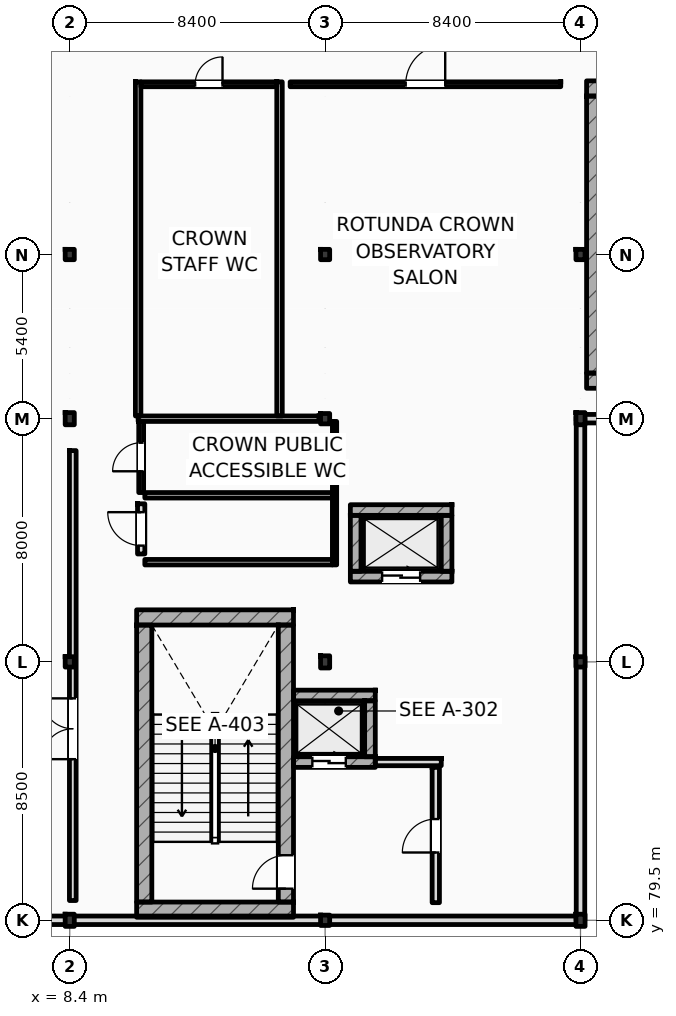
"""IFC4 building model, lengths in metres.
Left out: names, types, materials, properties, quantities, classifications, styles, units other than length and angle.
Written with IfcOpenShell. Run it as: python <this file> out.ifc"""

import sys

from ifc_helpers import new_model, si_unit, direction, frame, frame_2d, origin, origin_2d, place, context, subcontext, project, spatial, rectangle, i_section, extrude, element, fill, save


model = new_model("IFC4")
c1 = context("Model", 3, precision=1e-05, world=origin(), true_north=direction((0.0, 1.0)))
c2 = subcontext(c1, "Body", "Model", "MODEL_VIEW")
j1 = project(units=[si_unit("LENGTHUNIT", "METRE"), si_unit("PLANEANGLEUNIT", "RADIAN")], contexts=[c1])
p1 = place(None, origin())
s1 = spatial("IfcSite", under=j1, at=p1, CompositionType="ELEMENT")
p2 = place(p1, origin())
s2 = spatial("IfcBuilding", under=s1, at=p2, CompositionType="ELEMENT")
p3 = place(p2, frame((0.0, 0.0, 46.8)))
s3 = spatial("IfcBuildingStorey", under=s2, at=p3, CompositionType="ELEMENT", Elevation=46.8)
p4 = place(p3, frame((8.4, 79.5, 0.0), z_axis=(0.0, 0.0, 1.0), x_axis=(1.0, 0.0, 0.0)))
e1 = element("IfcColumn", 1, at=p4, inside=s3, PredefinedType="COLUMN", context=c2, shape_type="SweptSolid", body=[
    extrude(i_section(OverallWidth=0.3, OverallDepth=0.4, WebThickness=0.013, FlangeThickness=0.024, FilletRadius=0.027, at=origin_2d()), origin(), (0.0, 0.0, 1.0), 4.8),
])
p5 = place(p3, frame((8.4, 88.0, 0.0), z_axis=(0.0, 0.0, 1.0), x_axis=(1.0, 0.0, 0.0)))
e2 = element("IfcColumn", 2, at=p5, inside=s3, PredefinedType="COLUMN", context=c2, shape_type="SweptSolid", body=[
    extrude(i_section(OverallWidth=0.3, OverallDepth=0.34, WebThickness=0.012, FlangeThickness=0.021, FilletRadius=0.027, at=origin_2d()), origin(), (0.0, 0.0, 1.0), 4.8),
])
p6 = place(p3, frame((8.4, 96.0, 0.0), z_axis=(0.0, 0.0, 1.0), x_axis=(1.0, 0.0, 0.0)))
e3 = element("IfcColumn", 3, at=p6, inside=s3, PredefinedType="COLUMN", context=c2, shape_type="SweptSolid", body=[
    extrude(i_section(OverallWidth=0.3, OverallDepth=0.4, WebThickness=0.013, FlangeThickness=0.024, FilletRadius=0.027, at=origin_2d()), origin(), (0.0, 0.0, 1.0), 4.8),
])
p7 = place(p3, frame((16.8, 79.5, 0.0), z_axis=(0.0, 0.0, 1.0), x_axis=(1.0, 0.0, 0.0)))
e4 = element("IfcColumn", 4, at=p7, inside=s3, PredefinedType="COLUMN", context=c2, shape_type="SweptSolid", body=[
    extrude(i_section(OverallWidth=0.3, OverallDepth=0.34, WebThickness=0.012, FlangeThickness=0.021, FilletRadius=0.027, at=origin_2d()), origin(), (0.0, 0.0, 1.0), 4.8),
])
p8 = place(p3, frame((16.8, 88.0, 0.0), z_axis=(0.0, 0.0, 1.0), x_axis=(1.0, 0.0, 0.0)))
e5 = element("IfcColumn", 5, at=p8, inside=s3, PredefinedType="COLUMN", context=c2, shape_type="SweptSolid", body=[
    extrude(i_section(OverallWidth=0.3, OverallDepth=0.4, WebThickness=0.013, FlangeThickness=0.024, FilletRadius=0.027, at=origin_2d()), origin(), (0.0, 0.0, 1.0), 4.8),
])
p9 = place(p3, frame((16.8, 96.0, 0.0), z_axis=(0.0, 0.0, 1.0), x_axis=(1.0, 0.0, 0.0)))
e6 = element("IfcColumn", 6, at=p9, inside=s3, PredefinedType="COLUMN", context=c2, shape_type="SweptSolid", body=[
    extrude(i_section(OverallWidth=0.3, OverallDepth=0.34, WebThickness=0.012, FlangeThickness=0.021, FilletRadius=0.027, at=origin_2d()), origin(), (0.0, 0.0, 1.0), 4.8),
])
p10 = place(p3, frame((25.2, 79.5, 0.0), z_axis=(0.0, 0.0, 1.0), x_axis=(1.0, 0.0, 0.0)))
e7 = element("IfcColumn", 7, at=p10, inside=s3, PredefinedType="COLUMN", context=c2, shape_type="SweptSolid", body=[
    extrude(i_section(OverallWidth=0.3, OverallDepth=0.4, WebThickness=0.013, FlangeThickness=0.024, FilletRadius=0.027, at=origin_2d()), origin(), (0.0, 0.0, 1.0), 4.8),
])
p11 = place(p3, frame((25.2, 88.0, 0.0), z_axis=(0.0, 0.0, 1.0), x_axis=(1.0, 0.0, 0.0)))
e8 = element("IfcColumn", 8, at=p11, inside=s3, PredefinedType="COLUMN", context=c2, shape_type="SweptSolid", body=[
    extrude(i_section(OverallWidth=0.3, OverallDepth=0.34, WebThickness=0.012, FlangeThickness=0.021, FilletRadius=0.027, at=origin_2d()), origin(), (0.0, 0.0, 1.0), 4.8),
])
p12 = place(p3, frame((25.2, 96.0, 0.0), z_axis=(0.0, 0.0, 1.0), x_axis=(1.0, 0.0, 0.0)))
e9 = element("IfcColumn", 9, at=p12, inside=s3, PredefinedType="COLUMN", context=c2, shape_type="SweptSolid", body=[
    extrude(i_section(OverallWidth=0.3, OverallDepth=0.4, WebThickness=0.013, FlangeThickness=0.024, FilletRadius=0.027, at=origin_2d()), origin(), (0.0, 0.0, 1.0), 4.8),
])
for number, where, z_axis, x_axis in (
    (10, (8.4, 101.4, 0.0), (0.0, 0.0, 1.0), (1.0, 0.0, 0.0)),
    (11, (16.8, 101.4, 0.0), (0.0, 0.0, 1.0), (1.0, 0.0, 0.0)),
    (12, (25.2, 101.4, 0.0), (0.0, 0.0, 1.0), (1.0, 0.0, 0.0)),
):
    element("IfcColumn", number, at=place(p3, frame(where, z_axis=z_axis, x_axis=x_axis)), inside=s3, PredefinedType="COLUMN", context=c2, shape_type="SweptSolid", body=[
        extrude(i_section(OverallWidth=0.3, OverallDepth=0.34, WebThickness=0.012, FlangeThickness=0.021, FilletRadius=0.027, at=origin_2d()), origin(), (0.0, 0.0, 1.0), 4.8),
    ])
for number, where, z_axis, x_axis in (
    (13, (10.6, 89.462, 0.0), (0.0, 0.0, 1.0), (1.0, 0.0, 0.0)),
    (14, (10.6, 79.85, 0.0), (0.0, 0.0, 1.0), (1.0, 0.0, 0.0)),
):
    element("IfcWall", number, at=place(p3, frame(where, z_axis=z_axis, x_axis=x_axis)), inside=s3, PredefinedType="SHEAR", context=c2, shape_type="SweptSolid", body=[
        extrude(rectangle(XDim=5.16, YDim=0.5, at=frame_2d((2.58, 0.0))), origin(), (0.0, 0.0, 1.0), 4.8),
    ])
p13 = place(p3, frame((10.85, 80.1, 0.0), z_axis=(0.0, 0.0, 1.0), x_axis=(0.0, 1.0, 0.0)))
e15 = element("IfcWall", 15, at=p13, inside=s3, PredefinedType="SHEAR", context=c2, shape_type="SweptSolid", body=[
    extrude(rectangle(XDim=9.112, YDim=0.5, at=frame_2d((4.556, 0.0))), origin(), (0.0, 0.0, 1.0), 4.8),
])
p14 = place(p3, frame((15.51, 80.1, 0.0), z_axis=(0.0, 0.0, 1.0), x_axis=(0.0, 1.0, 0.0)))
e16 = element("IfcWall", 16, at=p14, inside=s3, PredefinedType="SHEAR", context=c2, shape_type="SweptSolid", body=[
    extrude(rectangle(XDim=9.112, YDim=0.5, at=frame_2d((4.556, 0.0))), origin(), (0.0, 0.0, 1.0), 4.8),
])
p15 = place(p14, frame((0.44, 0.0, 0.0)))
e17 = element("IfcOpeningElement", 17, at=p15, cuts=e16, PredefinedType="OPENING", context=c2, shape_type="SweptSolid", body=[
    extrude(rectangle(XDim=1.1, YDim=2.2, at=frame_2d((0.55, 1.1))), frame((0.0, 0.26, 0.0), z_axis=(0.0, -1.0, 0.0), x_axis=(1.0, 0.0, 0.0)), (0.0, 0.0, 1.0), 0.52),
])
for number, where, z_axis, x_axis in (
    (18, (25.4, 106.862, 0.0), (0.0, 0.0, 1.0), (1.0, 0.0, 0.0)),
    (19, (25.4, 97.25, 0.0), (0.0, 0.0, 1.0), (1.0, 0.0, 0.0)),
):
    element("IfcWall", number, at=place(p3, frame(where, z_axis=z_axis, x_axis=x_axis)), inside=s3, PredefinedType="SHEAR", context=c2, shape_type="SweptSolid", body=[
        extrude(rectangle(XDim=5.16, YDim=0.5, at=frame_2d((2.58, 0.0))), origin(), (0.0, 0.0, 1.0), 4.8),
    ])
p16 = place(p3, frame((25.65, 97.5, 0.0), z_axis=(0.0, 0.0, 1.0), x_axis=(0.0, 1.0, 0.0)))
e20 = element("IfcWall", 20, at=p16, inside=s3, PredefinedType="SHEAR", context=c2, shape_type="SweptSolid", body=[
    extrude(rectangle(XDim=9.112, YDim=0.5, at=frame_2d((4.556, 0.0))), origin(), (0.0, 0.0, 1.0), 4.8),
])
p17 = place(p3, frame((0.0, 79.5, 0.0), z_axis=(0.0, 0.0, 1.0), x_axis=(1.0, 0.0, 0.0)))
e21 = element("IfcWall", 21, at=p17, inside=s3, PredefinedType="STANDARD", context=c2, shape_type="SweptSolid", body=[
    extrude(rectangle(XDim=25.2, YDim=0.28, at=frame_2d((12.6, 0.0))), origin(), (0.0, 0.0, 1.0), 3.98),
])
p18 = place(p3, frame((25.2, 96.0, 0.0), z_axis=(0.0, 0.0, 1.0), x_axis=(1.0, 0.0, 0.0)))
e22 = element("IfcWall", 22, at=p18, inside=s3, PredefinedType="STANDARD", context=c2, shape_type="SweptSolid", body=[
    extrude(rectangle(XDim=54.6, YDim=0.28, at=frame_2d((27.3, 0.0))), origin(), (0.0, 0.0, 1.0), 4.08),
])
p19 = place(p3, frame((25.2, 79.5, 0.0), z_axis=(0.0, 0.0, 1.0), x_axis=(0.0, 1.0, 0.0)))
e23 = element("IfcWall", 23, at=p19, inside=s3, PredefinedType="STANDARD", context=c2, shape_type="SweptSolid", body=[
    extrude(rectangle(XDim=16.5, YDim=0.28, at=frame_2d((8.25, 0.0))), origin(), (0.0, 0.0, 1.0), 4.17),
])
p20 = place(p3, frame((15.76, 86.895, 0.0), z_axis=(0.0, 0.0, 1.0), x_axis=(1.0, 0.0, 0.0)))
e24 = element("IfcWall", 24, at=p20, inside=s3, PredefinedType="SHEAR", context=c2, shape_type="SweptSolid", body=[
    extrude(rectangle(XDim=2.69, YDim=0.35, at=frame_2d((1.345, 0.0))), origin(), (0.0, 0.0, 1.0), 4.54),
])
p21 = place(p3, frame((15.76, 84.705, 0.0), z_axis=(0.0, 0.0, 1.0), x_axis=(1.0, 0.0, 0.0)))
e25 = element("IfcWall", 25, at=p21, inside=s3, PredefinedType="SHEAR", context=c2, shape_type="SweptSolid", body=[
    extrude(rectangle(XDim=2.69, YDim=0.35, at=frame_2d((1.345, 0.0))), origin(), (0.0, 0.0, 1.0), 4.54),
])
p22 = place(p21, frame((0.62, 0.0, 0.0)))
e26 = element("IfcOpeningElement", 26, at=p22, cuts=e25, PredefinedType="OPENING", context=c2, shape_type="SweptSolid", body=[
    extrude(rectangle(XDim=1.1, YDim=2.2, at=frame_2d((0.55, 1.1))), frame((0.0, 0.185, 0.0), z_axis=(0.0, -1.0, 0.0), x_axis=(1.0, 0.0, 0.0)), (0.0, 0.0, 1.0), 0.37),
])
p23 = place(p3, frame((18.275, 84.88, 0.0), z_axis=(0.0, 0.0, 1.0), x_axis=(0.0, 1.0, 0.0)))
e27 = element("IfcWall", 27, at=p23, inside=s3, PredefinedType="SHEAR", context=c2, shape_type="SweptSolid", body=[
    extrude(rectangle(XDim=1.84, YDim=0.35, at=frame_2d((0.92, 0.0))), origin(), (0.0, 0.0, 1.0), 4.54),
])
p24 = place(p3, frame((17.63, 92.995, 0.0), z_axis=(0.0, 0.0, 1.0), x_axis=(1.0, 0.0, 0.0)))
e28 = element("IfcWall", 28, at=p24, inside=s3, PredefinedType="SHEAR", context=c2, shape_type="SweptSolid", body=[
    extrude(rectangle(XDim=3.34, YDim=0.35, at=frame_2d((1.67, 0.0))), origin(), (0.0, 0.0, 1.0), 4.54),
])
p25 = place(p3, frame((17.63, 90.805, 0.0), z_axis=(0.0, 0.0, 1.0), x_axis=(1.0, 0.0, 0.0)))
e29 = element("IfcWall", 29, at=p25, inside=s3, PredefinedType="SHEAR", context=c2, shape_type="SweptSolid", body=[
    extrude(rectangle(XDim=3.34, YDim=0.35, at=frame_2d((1.67, 0.0))), origin(), (0.0, 0.0, 1.0), 4.54),
])
p26 = place(p25, frame((1.045, 0.0, 0.0)))
e30 = element("IfcOpeningElement", 30, at=p26, cuts=e29, PredefinedType="OPENING", context=c2, shape_type="SweptSolid", body=[
    extrude(rectangle(XDim=1.25, YDim=2.25, at=frame_2d((0.625, 1.125))), frame((0.0, 0.185, 0.0), z_axis=(0.0, -1.0, 0.0), x_axis=(1.0, 0.0, 0.0)), (0.0, 0.0, 1.0), 0.37),
])
for number, where, z_axis, x_axis in (
    (31, (17.805, 90.98, 0.0), (0.0, 0.0, 1.0), (0.0, 1.0, 0.0)),
    (32, (20.795, 90.98, 0.0), (0.0, 0.0, 1.0), (0.0, 1.0, 0.0)),
):
    element("IfcWall", number, at=place(p3, frame(where, z_axis=z_axis, x_axis=x_axis)), inside=s3, PredefinedType="SHEAR", context=c2, shape_type="SweptSolid", body=[
        extrude(rectangle(XDim=1.84, YDim=0.35, at=frame_2d((0.92, 0.0))), origin(), (0.0, 0.0, 1.0), 4.54),
    ])
p27 = place(p3, frame((18.45, 84.705, 0.0), z_axis=(0.0, 0.0, 1.0), x_axis=(1.0, 0.0, 0.0)))
e33 = element("IfcWall", 33, at=p27, inside=s3, PredefinedType="STANDARD", context=c2, shape_type="SweptSolid", body=[
    extrude(rectangle(XDim=2.17, YDim=0.24, at=frame_2d((1.085, 0.0))), origin(), (0.0, 0.0, 1.0), 4.54),
])
p28 = place(p3, frame((20.44, 80.08, 0.0), z_axis=(0.0, 0.0, 1.0), x_axis=(0.0, 1.0, 0.0)))
e34 = element("IfcWall", 34, at=p28, inside=s3, PredefinedType="STANDARD", context=c2, shape_type="SweptSolid", body=[
    extrude(rectangle(XDim=4.45, YDim=0.24, at=frame_2d((2.225, 0.0))), origin(), (0.0, 0.0, 1.0), 4.54),
])
p29 = place(p28, frame((1.65, 0.0, 0.0)))
e35 = element("IfcOpeningElement", 35, at=p29, cuts=e34, PredefinedType="OPENING", context=c2, shape_type="SweptSolid", body=[
    extrude(rectangle(XDim=1.1, YDim=2.2, at=frame_2d((0.55, 1.1))), frame((0.0, 0.13, 0.0), z_axis=(0.0, -1.0, 0.0), x_axis=(1.0, 0.0, 0.0)), (0.0, 0.0, 1.0), 0.26),
])
p30 = place(p3, frame((15.65, 107.0, 0.0), z_axis=(0.0, 0.0, 1.0), x_axis=(1.0, 0.0, 0.0)))
e36 = element("IfcWall", 36, at=p30, inside=s3, PredefinedType="PARTITIONING", context=c2, shape_type="SweptSolid", body=[
    extrude(rectangle(XDim=8.9, YDim=0.16, at=frame_2d((4.45, 0.0))), origin(), (0.0, 0.0, 1.0), 4.54),
])
p31 = place(p30, frame((3.8, 0.0, 0.0)))
e37 = element("IfcOpeningElement", 37, at=p31, cuts=e36, PredefinedType="OPENING", context=c2, shape_type="SweptSolid", body=[
    extrude(rectangle(XDim=1.3, YDim=2.2, at=frame_2d((0.65, 1.1))), frame((0.0, 0.09, 0.0), z_axis=(0.0, -1.0, 0.0), x_axis=(1.0, 0.0, 0.0)), (0.0, 0.0, 1.0), 0.18),
])
p32 = place(p3, frame((8.5, 80.15, 0.0), z_axis=(0.0, 0.0, 1.0), x_axis=(0.0, 1.0, 0.0)))
e38 = element("IfcWall", 38, at=p32, inside=s3, PredefinedType="PARTITIONING", context=c2, shape_type="SweptSolid", body=[
    extrude(rectangle(XDim=14.8, YDim=0.22, at=frame_2d((7.4, 0.0))), origin(), (0.0, 0.0, 1.0), 4.17),
])
p33 = place(p32, frame((4.65, 0.0, 0.0)))
e39 = element("IfcOpeningElement", 39, at=p33, cuts=e38, PredefinedType="OPENING", context=c2, shape_type="SweptSolid", body=[
    extrude(rectangle(XDim=2.0, YDim=2.35, at=frame_2d((1.0, 1.175))), frame((0.0, 0.12, 0.0), z_axis=(0.0, -1.0, 0.0), x_axis=(1.0, 0.0, 0.0)), (0.0, 0.0, 1.0), 0.24),
])
p34 = place(p3, frame((10.75, 91.55, 0.0), z_axis=(0.0, 0.0, 1.0), x_axis=(0.0, 1.0, 0.0)))
e40 = element("IfcWall", 40, at=p34, inside=s3, PredefinedType="STANDARD", context=c2, shape_type="SweptSolid", body=[
    extrude(rectangle(XDim=1.65, YDim=0.24, at=frame_2d((0.825, 0.0))), origin(), (0.0, 0.0, 1.0), 4.54),
])
p35 = place(p34, frame((0.275, 0.0, 0.0)))
e41 = element("IfcOpeningElement", 41, at=p35, cuts=e40, PredefinedType="OPENING", context=c2, shape_type="SweptSolid", body=[
    extrude(rectangle(XDim=1.1, YDim=2.2, at=frame_2d((0.55, 1.1))), frame((0.0, 0.13, 0.0), z_axis=(0.0, -1.0, 0.0), x_axis=(1.0, 0.0, 0.0)), (0.0, 0.0, 1.0), 0.26),
])
p36 = place(p3, frame((10.75, 93.57, 0.0), z_axis=(0.0, 0.0, 1.0), x_axis=(0.0, 1.0, 0.0)))
e42 = element("IfcWall", 42, at=p36, inside=s3, PredefinedType="PARTITIONING", context=c2, shape_type="SweptSolid", body=[
    extrude(rectangle(XDim=2.34, YDim=0.16, at=frame_2d((1.17, 0.0))), origin(), (0.0, 0.0, 1.0), 4.54),
])
p37 = place(p36, frame((0.7, 0.0, 0.0)))
e43 = element("IfcOpeningElement", 43, at=p37, cuts=e42, PredefinedType="OPENING", context=c2, shape_type="SweptSolid", body=[
    extrude(rectangle(XDim=0.94, YDim=2.15, at=frame_2d((0.47, 1.075))), frame((0.0, 0.09, 0.0), z_axis=(0.0, -1.0, 0.0), x_axis=(1.0, 0.0, 0.0)), (0.0, 0.0, 1.0), 0.18),
])
p38 = place(p3, frame((10.74, 107.0, 0.0), z_axis=(0.0, 0.0, 1.0), x_axis=(1.0, 0.0, 0.0)))
e44 = element("IfcWall", 44, at=p38, inside=s3, PredefinedType="PARTITIONING", context=c2, shape_type="SweptSolid", body=[
    extrude(rectangle(XDim=4.47, YDim=0.16, at=frame_2d((2.235, 0.0))), origin(), (0.0, 0.0, 1.0), 4.54),
])
p39 = place(p38, frame((1.785, 0.0, 0.0)))
e45 = element("IfcOpeningElement", 45, at=p39, cuts=e44, PredefinedType="OPENING", context=c2, shape_type="SweptSolid", body=[
    extrude(rectangle(XDim=0.9, YDim=2.1, at=frame_2d((0.45, 1.05))), frame((0.0, 0.09, 0.0), z_axis=(0.0, -1.0, 0.0), x_axis=(1.0, 0.0, 0.0)), (0.0, 0.0, 1.0), 0.18),
])
for number, where, z_axis, x_axis in (
    (46, (10.87, 91.28, 0.0), (0.0, 0.0, 1.0), (1.0, 0.0, 0.0)),
    (47, (10.87, 93.48, 0.0), (0.0, 0.0, 1.0), (1.0, 0.0, 0.0)),
):
    element("IfcWall", number, at=place(p3, frame(where, z_axis=z_axis, x_axis=x_axis)), inside=s3, PredefinedType="PARTITIONING", context=c2, shape_type="SweptSolid", body=[
        extrude(rectangle(XDim=6.17, YDim=0.18, at=frame_2d((3.085, 0.0))), origin(), (0.0, 0.0, 1.0), 4.54),
    ])
p40 = place(p3, frame((17.11, 91.19, 0.0), z_axis=(0.0, 0.0, 1.0), x_axis=(0.0, 1.0, 0.0)))
e48 = element("IfcWall", 48, at=p40, inside=s3, PredefinedType="PARTITIONING", context=c2, shape_type="SweptSolid", body=[
    extrude(rectangle(XDim=4.72, YDim=0.14, at=frame_2d((2.36, 0.0))), origin(), (0.0, 0.0, 1.0), 4.54),
])
p41 = place(p3, frame((10.65, 96.0, 0.0), z_axis=(0.0, 0.0, 1.0), x_axis=(1.0, 0.0, 0.0)))
e49 = element("IfcWall", 49, at=p41, inside=s3, PredefinedType="PARTITIONING", context=c2, shape_type="SweptSolid", body=[
    extrude(rectangle(XDim=5.95, YDim=0.18, at=frame_2d((2.975, 0.0))), origin(), (0.0, 0.0, 1.0), 3.98),
])
for number, where, z_axis, x_axis in (
    (50, (10.65, 96.09, 0.0), (0.0, 0.0, 1.0), (0.0, 1.0, 0.0)),
    (51, (15.3, 96.09, 0.0), (0.0, 0.0, 1.0), (0.0, 1.0, 0.0)),
):
    element("IfcWall", number, at=place(p3, frame(where, z_axis=z_axis, x_axis=x_axis)), inside=s3, PredefinedType="PARTITIONING", context=c2, shape_type="SweptSolid", body=[
        extrude(rectangle(XDim=10.99, YDim=0.18, at=frame_2d((5.495, 0.0))), origin(), (0.0, 0.0, 1.0), 4.54),
    ])
p42 = place(p15, origin())
e52 = element("IfcDoor", 52, at=p42, inside=s3, OperationType="SINGLE_SWING_LEFT", PredefinedType="DOOR", context=c2, shape_type="SweptSolid", body=[
    extrude(rectangle(XDim=1.1, YDim=2.2, at=frame_2d((0.55, 1.1))), frame((0.0, 0.025, 0.0), z_axis=(0.0, -1.0, 0.0), x_axis=(1.0, 0.0, 0.0)), (0.0, 0.0, 1.0), 0.05),
])
fill(e17, e52)
p43 = place(p22, origin())
e53 = element("IfcDoor", 53, at=p43, inside=s3, OperationType="SLIDING_TO_LEFT", PredefinedType="DOOR", context=c2, shape_type="SweptSolid", body=[
    extrude(rectangle(XDim=1.1, YDim=2.2, at=frame_2d((0.55, 1.1))), frame((0.0, 0.025, 0.0), z_axis=(0.0, -1.0, 0.0), x_axis=(1.0, 0.0, 0.0)), (0.0, 0.0, 1.0), 0.05),
])
fill(e26, e53)
p44 = place(p26, origin())
e54 = element("IfcDoor", 54, at=p44, inside=s3, OperationType="SLIDING_TO_LEFT", PredefinedType="DOOR", context=c2, shape_type="SweptSolid", body=[
    extrude(rectangle(XDim=1.25, YDim=2.25, at=frame_2d((0.625, 1.125))), frame((0.0, 0.025, 0.0), z_axis=(0.0, -1.0, 0.0), x_axis=(1.0, 0.0, 0.0)), (0.0, 0.0, 1.0), 0.05),
])
fill(e30, e54)
p45 = place(p29, origin())
e55 = element("IfcDoor", 55, at=p45, inside=s3, OperationType="SINGLE_SWING_LEFT", PredefinedType="DOOR", context=c2, shape_type="SweptSolid", body=[
    extrude(rectangle(XDim=1.1, YDim=2.2, at=frame_2d((0.55, 1.1))), frame((0.0, 0.025, 0.0), z_axis=(0.0, -1.0, 0.0), x_axis=(1.0, 0.0, 0.0)), (0.0, 0.0, 1.0), 0.05),
])
fill(e35, e55)
p46 = place(p31, origin())
e56 = element("IfcDoor", 56, at=p46, inside=s3, OperationType="SINGLE_SWING_RIGHT", PredefinedType="DOOR", context=c2, shape_type="SweptSolid", body=[
    extrude(rectangle(XDim=1.3, YDim=2.2, at=frame_2d((0.65, 1.1))), frame((0.0, 0.025, 0.0), z_axis=(0.0, -1.0, 0.0), x_axis=(1.0, 0.0, 0.0)), (0.0, 0.0, 1.0), 0.05),
])
fill(e37, e56)
p47 = place(p33, origin())
e57 = element("IfcDoor", 57, at=p47, inside=s3, OperationType="DOUBLE_SWING_LEFT", PredefinedType="DOOR", context=c2, shape_type="SweptSolid", body=[
    extrude(rectangle(XDim=2.0, YDim=2.35, at=frame_2d((1.0, 1.175))), frame((0.0, 0.025, 0.0), z_axis=(0.0, -1.0, 0.0), x_axis=(1.0, 0.0, 0.0)), (0.0, 0.0, 1.0), 0.05),
])
fill(e39, e57)
p48 = place(p35, origin())
e58 = element("IfcDoor", 58, at=p48, inside=s3, OperationType="SINGLE_SWING_RIGHT", PredefinedType="DOOR", context=c2, shape_type="SweptSolid", body=[
    extrude(rectangle(XDim=1.1, YDim=2.2, at=frame_2d((0.55, 1.1))), frame((0.0, 0.025, 0.0), z_axis=(0.0, -1.0, 0.0), x_axis=(1.0, 0.0, 0.0)), (0.0, 0.0, 1.0), 0.05),
])
fill(e41, e58)
p49 = place(p37, origin())
e59 = element("IfcDoor", 59, at=p49, inside=s3, OperationType="SINGLE_SWING_LEFT", PredefinedType="DOOR", context=c2, shape_type="SweptSolid", body=[
    extrude(rectangle(XDim=0.94, YDim=2.15, at=frame_2d((0.47, 1.075))), frame((0.0, 0.025, 0.0), z_axis=(0.0, -1.0, 0.0), x_axis=(1.0, 0.0, 0.0)), (0.0, 0.0, 1.0), 0.05),
])
fill(e43, e59)
p50 = place(p39, origin())
e60 = element("IfcDoor", 60, at=p50, inside=s3, OperationType="SINGLE_SWING_RIGHT", PredefinedType="DOOR", context=c2, shape_type="SweptSolid", body=[
    extrude(rectangle(XDim=0.9, YDim=2.1, at=frame_2d((0.45, 1.05))), frame((0.0, 0.025, 0.0), z_axis=(0.0, -1.0, 0.0), x_axis=(1.0, 0.0, 0.0)), (0.0, 0.0, 1.0), 0.05),
])
fill(e45, e60)
save(model, sys.argv[1])
